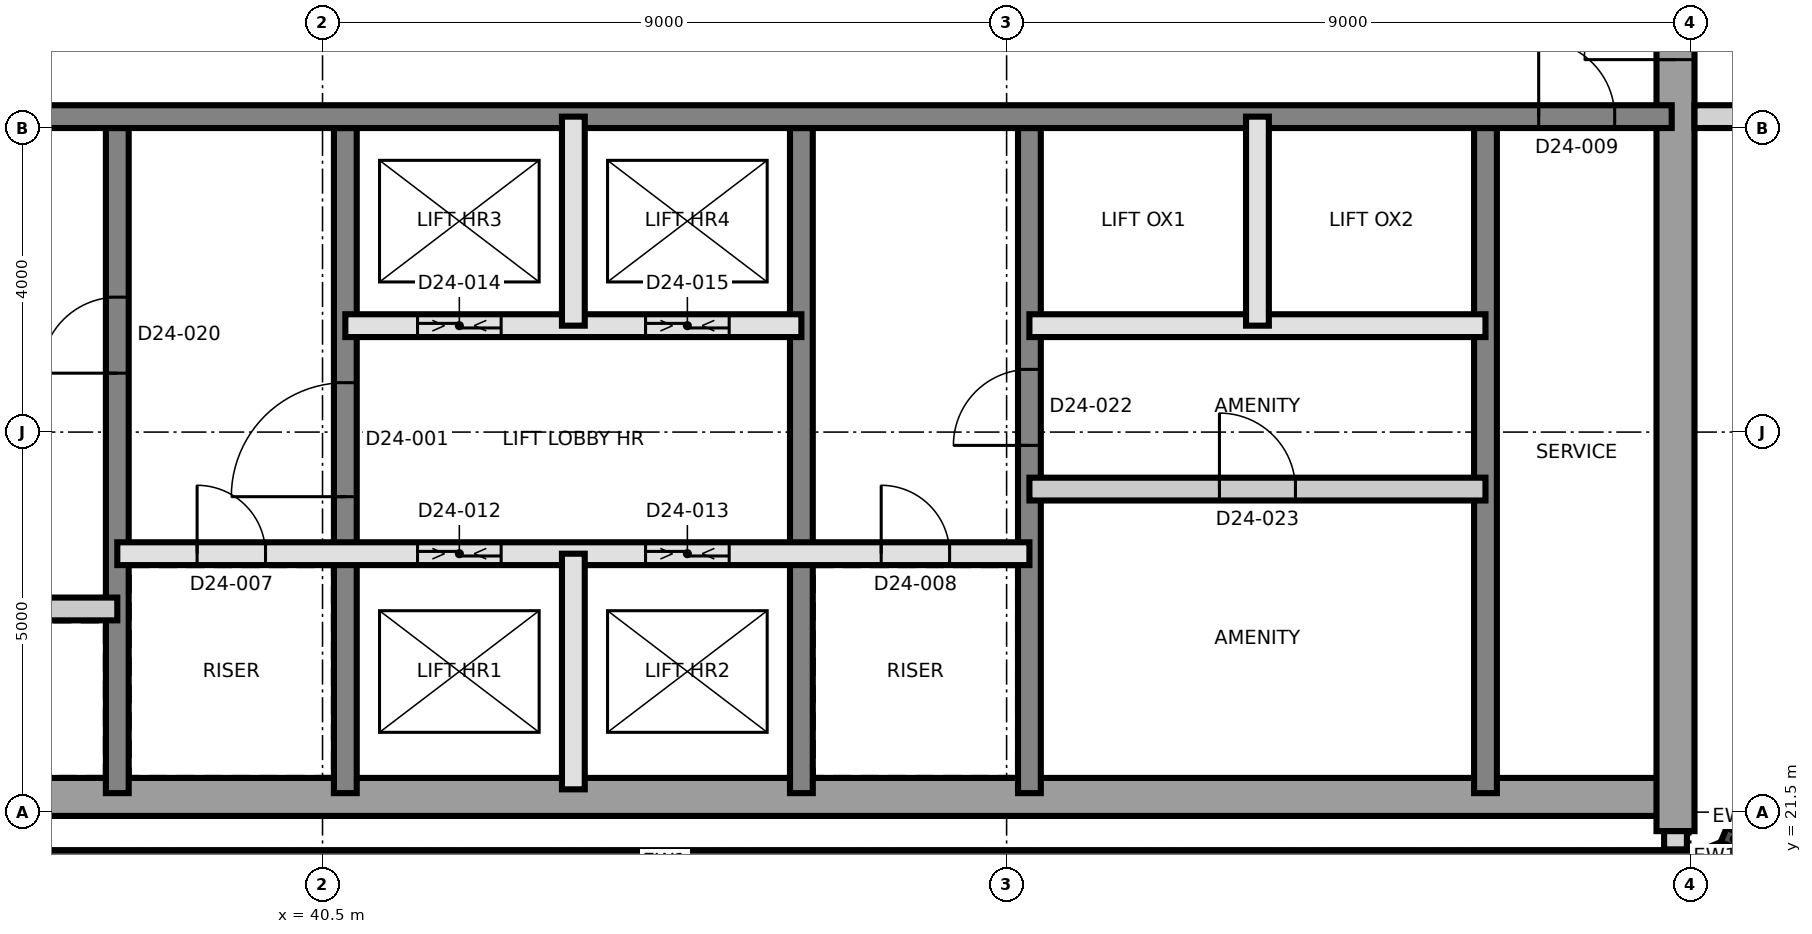
"""IFC4 building model, lengths in metres.
Left out: names, types, materials, properties, quantities, classifications, styles, units other than length and angle.
Written with IfcOpenShell. Run it as: python <this file> out.ifc"""

import sys

from ifc_helpers import new_model, si_unit, direction, frame, frame_2d, origin, place, context, subcontext, project, spatial, rectangle, extrude, element, fill, save


model = new_model("IFC4")
c1 = context("Model", 3, precision=1e-05, world=origin(), true_north=direction((0.0, 1.0)))
c2 = subcontext(c1, "Body", "Model", "MODEL_VIEW")
j1 = project(units=[si_unit("LENGTHUNIT", "METRE"), si_unit("PLANEANGLEUNIT", "RADIAN")], contexts=[c1])
p1 = place(None, origin())
s1 = spatial("IfcSite", under=j1, at=p1, CompositionType="ELEMENT")
p2 = place(p1, origin())
s2 = spatial("IfcBuilding", under=s1, at=p2, CompositionType="ELEMENT")
p3 = place(p2, frame((0.0, 0.0, 221.7)))
s3 = spatial("IfcBuildingStorey", under=s2, at=p3, CompositionType="ELEMENT", Elevation=221.7)
p4 = place(p3, frame((31.25, 21.7, 0.0), z_axis=(0.0, 0.0, 1.0), x_axis=(1.0, 0.0, 0.0)))
e1 = element("IfcWall", 1, at=p4, inside=s3, PredefinedType="SHEAR", context=c2, shape_type="SweptSolid", body=[
    extrude(rectangle(XDim=27.0, YDim=0.5, at=frame_2d((13.5, 0.0))), origin(), (0.0, 0.0, 1.0), 3.7),
])
p5 = place(p3, frame((58.3, 21.25, 0.0), z_axis=(0.0, 0.0, 1.0), x_axis=(0.0, 1.0, 0.0)))
e2 = element("IfcWall", 2, at=p5, inside=s3, PredefinedType="SHEAR", context=c2, shape_type="SweptSolid", body=[
    extrude(rectangle(XDim=18.5, YDim=0.5, at=frame_2d((9.25, 0.0))), origin(), (0.0, 0.0, 1.0), 3.7),
])
p6 = place(p5, frame((10.15, 0.0, 0.0)))
e3 = element("IfcOpeningElement", 3, at=p6, cuts=e2, PredefinedType="OPENING", context=c2, shape_type="SweptSolid", body=[
    extrude(rectangle(XDim=1.2, YDim=2.1, at=frame_2d((0.6, 1.05))), frame((0.0, 0.26, 0.0), z_axis=(0.0, -1.0, 0.0), x_axis=(1.0, 0.0, 0.0)), (0.0, 0.0, 1.0), 0.52),
])
p7 = place(p3, frame((37.8, 21.75, 0.0), z_axis=(0.0, 0.0, 1.0), x_axis=(0.0, 1.0, 0.0)))
e4 = element("IfcWall", 4, at=p7, inside=s3, PredefinedType="SHEAR", context=c2, shape_type="SweptSolid", body=[
    extrude(rectangle(XDim=8.75, YDim=0.3, at=frame_2d((4.375, 0.0))), origin(), (0.0, 0.0, 1.0), 3.7),
])
p8 = place(p7, frame((5.525, 0.0, 0.0)))
e5 = element("IfcOpeningElement", 5, at=p8, cuts=e4, PredefinedType="OPENING", context=c2, shape_type="SweptSolid", body=[
    extrude(rectangle(XDim=1.0, YDim=2.1, at=frame_2d((0.5, 1.05))), frame((0.0, 0.16, 0.0), z_axis=(0.0, -1.0, 0.0), x_axis=(1.0, 0.0, 0.0)), (0.0, 0.0, 1.0), 0.32),
])
p9 = place(p3, frame((40.8, 21.75, 0.0), z_axis=(0.0, 0.0, 1.0), x_axis=(0.0, 1.0, 0.0)))
e6 = element("IfcWall", 6, at=p9, inside=s3, PredefinedType="SHEAR", context=c2, shape_type="SweptSolid", body=[
    extrude(rectangle(XDim=8.75, YDim=0.3, at=frame_2d((4.375, 0.0))), origin(), (0.0, 0.0, 1.0), 3.7),
])
p10 = place(p9, frame((3.9, 0.0, 0.0)))
e7 = element("IfcOpeningElement", 7, at=p10, cuts=e6, PredefinedType="OPENING", context=c2, shape_type="SweptSolid", body=[
    extrude(rectangle(XDim=1.5, YDim=2.1, at=frame_2d((0.75, 1.05))), frame((0.0, 0.16, 0.0), z_axis=(0.0, -1.0, 0.0), x_axis=(1.0, 0.0, 0.0)), (0.0, 0.0, 1.0), 0.32),
])
p11 = place(p3, frame((46.8, 21.75, 0.0), z_axis=(0.0, 0.0, 1.0), x_axis=(0.0, 1.0, 0.0)))
e8 = element("IfcWall", 8, at=p11, inside=s3, PredefinedType="SHEAR", context=c2, shape_type="SweptSolid", body=[
    extrude(rectangle(XDim=8.75, YDim=0.3, at=frame_2d((4.375, 0.0))), origin(), (0.0, 0.0, 1.0), 3.7),
])
p12 = place(p3, frame((49.8, 21.75, 0.0), z_axis=(0.0, 0.0, 1.0), x_axis=(0.0, 1.0, 0.0)))
e9 = element("IfcWall", 9, at=p12, inside=s3, PredefinedType="SHEAR", context=c2, shape_type="SweptSolid", body=[
    extrude(rectangle(XDim=8.75, YDim=0.3, at=frame_2d((4.375, 0.0))), origin(), (0.0, 0.0, 1.0), 3.7),
])
p13 = place(p12, frame((4.575, 0.0, 0.0)))
e10 = element("IfcOpeningElement", 10, at=p13, cuts=e9, PredefinedType="OPENING", context=c2, shape_type="SweptSolid", body=[
    extrude(rectangle(XDim=1.0, YDim=2.1, at=frame_2d((0.5, 1.05))), frame((0.0, 0.16, 0.0), z_axis=(0.0, -1.0, 0.0), x_axis=(1.0, 0.0, 0.0)), (0.0, 0.0, 1.0), 0.32),
])
p14 = place(p3, frame((55.8, 21.75, 0.0), z_axis=(0.0, 0.0, 1.0), x_axis=(0.0, 1.0, 0.0)))
e11 = element("IfcWall", 11, at=p14, inside=s3, PredefinedType="SHEAR", context=c2, shape_type="SweptSolid", body=[
    extrude(rectangle(XDim=8.75, YDim=0.3, at=frame_2d((4.375, 0.0))), origin(), (0.0, 0.0, 1.0), 3.7),
])
p15 = place(p3, frame((31.75, 30.65, 0.0), z_axis=(0.0, 0.0, 1.0), x_axis=(1.0, 0.0, 0.0)))
e12 = element("IfcWall", 12, at=p15, inside=s3, PredefinedType="SHEAR", context=c2, shape_type="SweptSolid", body=[
    extrude(rectangle(XDim=26.5, YDim=0.3, at=frame_2d((13.25, 0.0))), origin(), (0.0, 0.0, 1.0), 3.7),
])
p16 = place(p15, frame((24.75, 0.0, 0.0)))
e13 = element("IfcOpeningElement", 13, at=p16, cuts=e12, PredefinedType="OPENING", context=c2, shape_type="SweptSolid", body=[
    extrude(rectangle(XDim=1.0, YDim=2.1, at=frame_2d((0.5, 1.05))), frame((0.0, 0.16, 0.0), z_axis=(0.0, -1.0, 0.0), x_axis=(1.0, 0.0, 0.0)), (0.0, 0.0, 1.0), 0.32),
])
p17 = place(p3, frame((31.36, 20.85, 0.0), z_axis=(0.0, 0.0, 1.0), x_axis=(1.0, 0.0, 0.0)))
e14 = element("IfcWall", 14, at=p17, inside=s3, PredefinedType="SOLIDWALL", context=c2, shape_type="SweptSolid", body=[
    extrude(rectangle(XDim=27.281, YDim=0.3, at=frame_2d((13.64, 0.0))), origin(), (0.0, 0.0, 1.0), 3.4),
])
p18 = place(p3, frame((58.698, 20.861, 0.0), z_axis=(0.0, 0.0, 1.0), x_axis=(0.923757413239, 0.38297812142, 0.0)))
e15 = element("IfcWall", 15, at=p18, inside=s3, PredefinedType="SOLIDWALL", context=c2, shape_type="SweptSolid", body=[
    extrude(rectangle(XDim=0.275, YDim=0.3, at=frame_2d((0.138, 0.0))), origin(), (0.0, 0.0, 1.0), 3.4),
])
p19 = place(p3, frame((59.033, 21.048, 0.0), z_axis=(0.0, 0.0, 1.0), x_axis=(0.383262727373, 0.923639367831, 0.0)))
e16 = element("IfcWall", 16, at=p19, inside=s3, PredefinedType="SOLIDWALL", context=c2, shape_type="SweptSolid", body=[
    extrude(rectangle(XDim=0.205, YDim=0.3, at=frame_2d((0.103, 0.0))), origin(), (0.0, 0.0, 1.0), 3.4),
])
p20 = place(p3, frame((31.8, 24.173, 0.0), z_axis=(0.0, 0.0, 1.0), x_axis=(1.0, 0.0, 0.0)))
e17 = element("IfcWall", 17, at=p20, inside=s3, PredefinedType="PARTITIONING", context=c2, shape_type="SweptSolid", body=[
    extrude(rectangle(XDim=6.0, YDim=0.3, at=frame_2d((3.0, 0.0))), origin(), (0.0, 0.0, 1.0), 3.4),
])
p21 = place(p20, frame((2.5, 0.0, 0.0)))
e18 = element("IfcOpeningElement", 18, at=p21, cuts=e17, PredefinedType="OPENING", context=c2, shape_type="SweptSolid", body=[
    extrude(rectangle(XDim=1.0, YDim=2.1, at=frame_2d((0.5, 1.05))), frame((0.0, 0.16, 0.0), z_axis=(0.0, -1.0, 0.0), x_axis=(1.0, 0.0, 0.0)), (0.0, 0.0, 1.0), 0.32),
])
p22 = place(p3, frame((37.8, 24.9, 0.0), z_axis=(0.0, 0.0, 1.0), x_axis=(1.0, 0.0, 0.0)))
e19 = element("IfcWall", 19, at=p22, inside=s3, PredefinedType="SOLIDWALL", context=c2, shape_type="SweptSolid", body=[
    extrude(rectangle(XDim=12.0, YDim=0.3, at=frame_2d((6.0, 0.0))), origin(), (0.0, 0.0, 1.0), 3.4),
])
p23 = place(p22, frame((1.05, 0.0, 0.0)))
e20 = element("IfcOpeningElement", 20, at=p23, cuts=e19, PredefinedType="OPENING", context=c2, shape_type="SweptSolid", body=[
    extrude(rectangle(XDim=0.9, YDim=2.1, at=frame_2d((0.45, 1.05))), frame((0.0, 0.16, 0.0), z_axis=(0.0, -1.0, 0.0), x_axis=(1.0, 0.0, 0.0)), (0.0, 0.0, 1.0), 0.32),
])
p24 = place(p22, frame((10.05, 0.0, 0.0)))
e21 = element("IfcOpeningElement", 21, at=p24, cuts=e19, PredefinedType="OPENING", context=c2, shape_type="SweptSolid", body=[
    extrude(rectangle(XDim=0.9, YDim=2.1, at=frame_2d((0.45, 1.05))), frame((0.0, 0.16, 0.0), z_axis=(0.0, -1.0, 0.0), x_axis=(1.0, 0.0, 0.0)), (0.0, 0.0, 1.0), 0.32),
])
p25 = place(p22, frame((3.95, 0.0, 0.0)))
e22 = element("IfcOpeningElement", 22, at=p25, cuts=e19, PredefinedType="OPENING", context=c2, shape_type="SweptSolid", body=[
    extrude(rectangle(XDim=1.1, YDim=2.4, at=frame_2d((0.55, 1.2))), frame((0.0, 0.16, 0.0), z_axis=(0.0, -1.0, 0.0), x_axis=(1.0, 0.0, 0.0)), (0.0, 0.0, 1.0), 0.32),
])
p26 = place(p22, frame((6.95, 0.0, 0.0)))
e23 = element("IfcOpeningElement", 23, at=p26, cuts=e19, PredefinedType="OPENING", context=c2, shape_type="SweptSolid", body=[
    extrude(rectangle(XDim=1.1, YDim=2.4, at=frame_2d((0.55, 1.2))), frame((0.0, 0.16, 0.0), z_axis=(0.0, -1.0, 0.0), x_axis=(1.0, 0.0, 0.0)), (0.0, 0.0, 1.0), 0.32),
])
p27 = place(p3, frame((49.8, 25.75, 0.0), z_axis=(0.0, 0.0, 1.0), x_axis=(1.0, 0.0, 0.0)))
e24 = element("IfcWall", 24, at=p27, inside=s3, PredefinedType="PARTITIONING", context=c2, shape_type="SweptSolid", body=[
    extrude(rectangle(XDim=6.0, YDim=0.3, at=frame_2d((3.0, 0.0))), origin(), (0.0, 0.0, 1.0), 3.4),
])
p28 = place(p27, frame((2.5, 0.0, 0.0)))
e25 = element("IfcOpeningElement", 25, at=p28, cuts=e24, PredefinedType="OPENING", context=c2, shape_type="SweptSolid", body=[
    extrude(rectangle(XDim=1.0, YDim=2.1, at=frame_2d((0.5, 1.05))), frame((0.0, 0.16, 0.0), z_axis=(0.0, -1.0, 0.0), x_axis=(1.0, 0.0, 0.0)), (0.0, 0.0, 1.0), 0.32),
])
p29 = place(p3, frame((40.8, 27.9, 0.0), z_axis=(0.0, 0.0, 1.0), x_axis=(1.0, 0.0, 0.0)))
e26 = element("IfcWall", 26, at=p29, inside=s3, PredefinedType="SOLIDWALL", context=c2, shape_type="SweptSolid", body=[
    extrude(rectangle(XDim=6.0, YDim=0.3, at=frame_2d((3.0, 0.0))), origin(), (0.0, 0.0, 1.0), 3.4),
])
p30 = place(p29, frame((0.95, 0.0, 0.0)))
e27 = element("IfcOpeningElement", 27, at=p30, cuts=e26, PredefinedType="OPENING", context=c2, shape_type="SweptSolid", body=[
    extrude(rectangle(XDim=1.1, YDim=2.4, at=frame_2d((0.55, 1.2))), frame((0.0, 0.16, 0.0), z_axis=(0.0, -1.0, 0.0), x_axis=(1.0, 0.0, 0.0)), (0.0, 0.0, 1.0), 0.32),
])
p31 = place(p29, frame((3.95, 0.0, 0.0)))
e28 = element("IfcOpeningElement", 28, at=p31, cuts=e26, PredefinedType="OPENING", context=c2, shape_type="SweptSolid", body=[
    extrude(rectangle(XDim=1.1, YDim=2.4, at=frame_2d((0.55, 1.2))), frame((0.0, 0.16, 0.0), z_axis=(0.0, -1.0, 0.0), x_axis=(1.0, 0.0, 0.0)), (0.0, 0.0, 1.0), 0.32),
])
p32 = place(p3, frame((49.8, 27.9, 0.0), z_axis=(0.0, 0.0, 1.0), x_axis=(1.0, 0.0, 0.0)))
e29 = element("IfcWall", 29, at=p32, inside=s3, PredefinedType="SOLIDWALL", context=c2, shape_type="SweptSolid", body=[
    extrude(rectangle(XDim=6.0, YDim=0.3, at=frame_2d((3.0, 0.0))), origin(), (0.0, 0.0, 1.0), 3.4),
])
p33 = place(p3, frame((43.8, 21.8, 0.0), z_axis=(0.0, 0.0, 1.0), x_axis=(0.0, 1.0, 0.0)))
e30 = element("IfcWall", 30, at=p33, inside=s3, PredefinedType="SOLIDWALL", context=c2, shape_type="SweptSolid", body=[
    extrude(rectangle(XDim=3.1, YDim=0.3, at=frame_2d((1.55, 0.0))), origin(), (0.0, 0.0, 1.0), 3.4),
])
for number, where, z_axis, x_axis in (
    (31, (43.8, 27.9, 0.0), (0.0, 0.0, 1.0), (0.0, 1.0, 0.0)),
    (32, (52.8, 27.9, 0.0), (0.0, 0.0, 1.0), (0.0, 1.0, 0.0)),
):
    element("IfcWall", number, at=place(p3, frame(where, z_axis=z_axis, x_axis=x_axis)), inside=s3, PredefinedType="SOLIDWALL", context=c2, shape_type="SweptSolid", body=[
        extrude(rectangle(XDim=2.75, YDim=0.3, at=frame_2d((1.375, 0.0))), origin(), (0.0, 0.0, 1.0), 3.4),
    ])
p34 = place(p3, frame((58.55, 30.65, 0.0), z_axis=(0.0, 0.0, 1.0), x_axis=(1.0, 0.0, 0.0)))
e33 = element("IfcWall", 33, at=p34, inside=s3, PredefinedType="PARTITIONING", context=c2, shape_type="SweptSolid", body=[
    extrude(rectangle(XDim=26.78, YDim=0.3, at=frame_2d((13.39, 0.0))), origin(), (0.0, 0.0, 1.0), 3.4),
])
p35 = place(p34, frame((2.3, 0.0, 0.0)))
e34 = element("IfcOpeningElement", 34, at=p35, cuts=e33, PredefinedType="OPENING", context=c2, shape_type="SweptSolid", body=[
    extrude(rectangle(XDim=1.0, YDim=2.4, at=frame_2d((0.5, 1.2))), frame((0.0, 0.16, 0.0), z_axis=(0.0, -1.0, 0.0), x_axis=(1.0, 0.0, 0.0)), (0.0, 0.0, 1.0), 0.32),
])
p36 = place(p34, frame((10.1, 0.0, 0.0)))
e35 = element("IfcOpeningElement", 35, at=p36, cuts=e33, PredefinedType="OPENING", context=c2, shape_type="SweptSolid", body=[
    extrude(rectangle(XDim=1.0, YDim=2.1, at=frame_2d((0.5, 1.05))), frame((0.0, 0.16, 0.0), z_axis=(0.0, -1.0, 0.0), x_axis=(1.0, 0.0, 0.0)), (0.0, 0.0, 1.0), 0.32),
])
p37 = place(p34, frame((15.95, 0.0, 0.0)))
e36 = element("IfcOpeningElement", 36, at=p37, cuts=e33, PredefinedType="OPENING", context=c2, shape_type="SweptSolid", body=[
    extrude(rectangle(XDim=1.0, YDim=2.1, at=frame_2d((0.5, 1.05))), frame((0.0, 0.16, 0.0), z_axis=(0.0, -1.0, 0.0), x_axis=(1.0, 0.0, 0.0)), (0.0, 0.0, 1.0), 0.32),
])
p38 = place(p34, frame((19.085, 0.0, 0.0)))
e37 = element("IfcOpeningElement", 37, at=p38, cuts=e33, PredefinedType="OPENING", context=c2, shape_type="SweptSolid", body=[
    extrude(rectangle(XDim=1.2, YDim=2.1, at=frame_2d((0.6, 1.05))), frame((0.0, 0.16, 0.0), z_axis=(0.0, -1.0, 0.0), x_axis=(1.0, 0.0, 0.0)), (0.0, 0.0, 1.0), 0.32),
])
p39 = place(p34, frame((22.335, 0.0, 0.0)))
e38 = element("IfcOpeningElement", 38, at=p39, cuts=e33, PredefinedType="OPENING", context=c2, shape_type="SweptSolid", body=[
    extrude(rectangle(XDim=1.0, YDim=2.1, at=frame_2d((0.5, 1.05))), frame((0.0, 0.16, 0.0), z_axis=(0.0, -1.0, 0.0), x_axis=(1.0, 0.0, 0.0)), (0.0, 0.0, 1.0), 0.32),
])
p40 = place(p3, frame((58.3, 21.25, 0.0), z_axis=(0.0, 0.0, 1.0), x_axis=(0.0, -1.0, 0.0)))
e39 = element("IfcWall", 39, at=p40, inside=s3, PredefinedType="PARTITIONING", context=c2, shape_type="SweptSolid", body=[
    extrude(rectangle(XDim=0.24, YDim=0.3, at=frame_2d((0.12, 0.0))), origin(), (0.0, 0.0, 1.0), 3.4),
])
p41 = place(p10, origin())
e40 = element("IfcDoor", 40, at=p41, inside=s3, OperationType="SINGLE_SWING_RIGHT", PredefinedType="DOOR", context=c2, shape_type="SweptSolid", body=[
    extrude(rectangle(XDim=1.5, YDim=2.1, at=frame_2d((0.75, 1.05))), frame((0.0, 0.025, 0.0), z_axis=(0.0, -1.0, 0.0), x_axis=(1.0, 0.0, 0.0)), (0.0, 0.0, 1.0), 0.05),
])
fill(e7, e40)
p42 = place(p23, origin())
e41 = element("IfcDoor", 41, at=p42, inside=s3, OperationType="SINGLE_SWING_LEFT", PredefinedType="DOOR", context=c2, shape_type="SweptSolid", body=[
    extrude(rectangle(XDim=0.9, YDim=2.1, at=frame_2d((0.45, 1.05))), frame((0.0, 0.025, 0.0), z_axis=(0.0, -1.0, 0.0), x_axis=(1.0, 0.0, 0.0)), (0.0, 0.0, 1.0), 0.05),
])
fill(e20, e41)
p43 = place(p24, origin())
e42 = element("IfcDoor", 42, at=p43, inside=s3, OperationType="SINGLE_SWING_RIGHT", PredefinedType="DOOR", context=c2, shape_type="SweptSolid", body=[
    extrude(rectangle(XDim=0.9, YDim=2.1, at=frame_2d((0.45, 1.05))), frame((0.0, 0.025, 0.0), z_axis=(0.0, -1.0, 0.0), x_axis=(1.0, 0.0, 0.0)), (0.0, 0.0, 1.0), 0.05),
])
fill(e21, e42)
p44 = place(p16, origin())
e43 = element("IfcDoor", 43, at=p44, inside=s3, OperationType="SINGLE_SWING_LEFT", PredefinedType="DOOR", context=c2, shape_type="SweptSolid", body=[
    extrude(rectangle(XDim=1.0, YDim=2.1, at=frame_2d((0.5, 1.05))), frame((0.0, 0.025, 0.0), z_axis=(0.0, -1.0, 0.0), x_axis=(1.0, 0.0, 0.0)), (0.0, 0.0, 1.0), 0.05),
])
fill(e13, e43)
p45 = place(p6, origin())
e44 = element("IfcDoor", 44, at=p45, inside=s3, OperationType="SINGLE_SWING_LEFT", PredefinedType="DOOR", context=c2, shape_type="SweptSolid", body=[
    extrude(rectangle(XDim=1.2, YDim=2.1, at=frame_2d((0.6, 1.05))), frame((0.0, 0.025, 0.0), z_axis=(0.0, -1.0, 0.0), x_axis=(1.0, 0.0, 0.0)), (0.0, 0.0, 1.0), 0.05),
])
fill(e3, e44)
p46 = place(p25, origin())
e45 = element("IfcDoor", 45, at=p46, inside=s3, OperationType="SLIDING_TO_LEFT", PredefinedType="DOOR", context=c2, shape_type="SweptSolid", body=[
    extrude(rectangle(XDim=1.1, YDim=2.4, at=frame_2d((0.55, 1.2))), frame((0.0, 0.025, 0.0), z_axis=(0.0, -1.0, 0.0), x_axis=(1.0, 0.0, 0.0)), (0.0, 0.0, 1.0), 0.05),
])
fill(e22, e45)
p47 = place(p26, origin())
e46 = element("IfcDoor", 46, at=p47, inside=s3, OperationType="SLIDING_TO_LEFT", PredefinedType="DOOR", context=c2, shape_type="SweptSolid", body=[
    extrude(rectangle(XDim=1.1, YDim=2.4, at=frame_2d((0.55, 1.2))), frame((0.0, 0.025, 0.0), z_axis=(0.0, -1.0, 0.0), x_axis=(1.0, 0.0, 0.0)), (0.0, 0.0, 1.0), 0.05),
])
fill(e23, e46)
p48 = place(p30, origin())
e47 = element("IfcDoor", 47, at=p48, inside=s3, OperationType="SLIDING_TO_LEFT", PredefinedType="DOOR", context=c2, shape_type="SweptSolid", body=[
    extrude(rectangle(XDim=1.1, YDim=2.4, at=frame_2d((0.55, 1.2))), frame((0.0, 0.025, 0.0), z_axis=(0.0, -1.0, 0.0), x_axis=(1.0, 0.0, 0.0)), (0.0, 0.0, 1.0), 0.05),
])
fill(e27, e47)
p49 = place(p31, origin())
e48 = element("IfcDoor", 48, at=p49, inside=s3, OperationType="SLIDING_TO_LEFT", PredefinedType="DOOR", context=c2, shape_type="SweptSolid", body=[
    extrude(rectangle(XDim=1.1, YDim=2.4, at=frame_2d((0.55, 1.2))), frame((0.0, 0.025, 0.0), z_axis=(0.0, -1.0, 0.0), x_axis=(1.0, 0.0, 0.0)), (0.0, 0.0, 1.0), 0.05),
])
fill(e28, e48)
p50 = place(p8, origin())
e49 = element("IfcDoor", 49, at=p50, inside=s3, OperationType="SINGLE_SWING_LEFT", PredefinedType="DOOR", context=c2, shape_type="SweptSolid", body=[
    extrude(rectangle(XDim=1.0, YDim=2.1, at=frame_2d((0.5, 1.05))), frame((0.0, 0.025, 0.0), z_axis=(0.0, -1.0, 0.0), x_axis=(1.0, 0.0, 0.0)), (0.0, 0.0, 1.0), 0.05),
])
fill(e5, e49)
p51 = place(p13, origin())
e50 = element("IfcDoor", 50, at=p51, inside=s3, OperationType="SINGLE_SWING_LEFT", PredefinedType="DOOR", context=c2, shape_type="SweptSolid", body=[
    extrude(rectangle(XDim=1.0, YDim=2.1, at=frame_2d((0.5, 1.05))), frame((0.0, 0.025, 0.0), z_axis=(0.0, -1.0, 0.0), x_axis=(1.0, 0.0, 0.0)), (0.0, 0.0, 1.0), 0.05),
])
fill(e10, e50)
p52 = place(p28, origin())
e51 = element("IfcDoor", 51, at=p52, inside=s3, OperationType="SINGLE_SWING_RIGHT", PredefinedType="DOOR", context=c2, shape_type="SweptSolid", body=[
    extrude(rectangle(XDim=1.0, YDim=2.1, at=frame_2d((0.5, 1.05))), frame((0.0, 0.025, 0.0), z_axis=(0.0, -1.0, 0.0), x_axis=(1.0, 0.0, 0.0)), (0.0, 0.0, 1.0), 0.05),
])
fill(e25, e51)
save(model, sys.argv[1])
